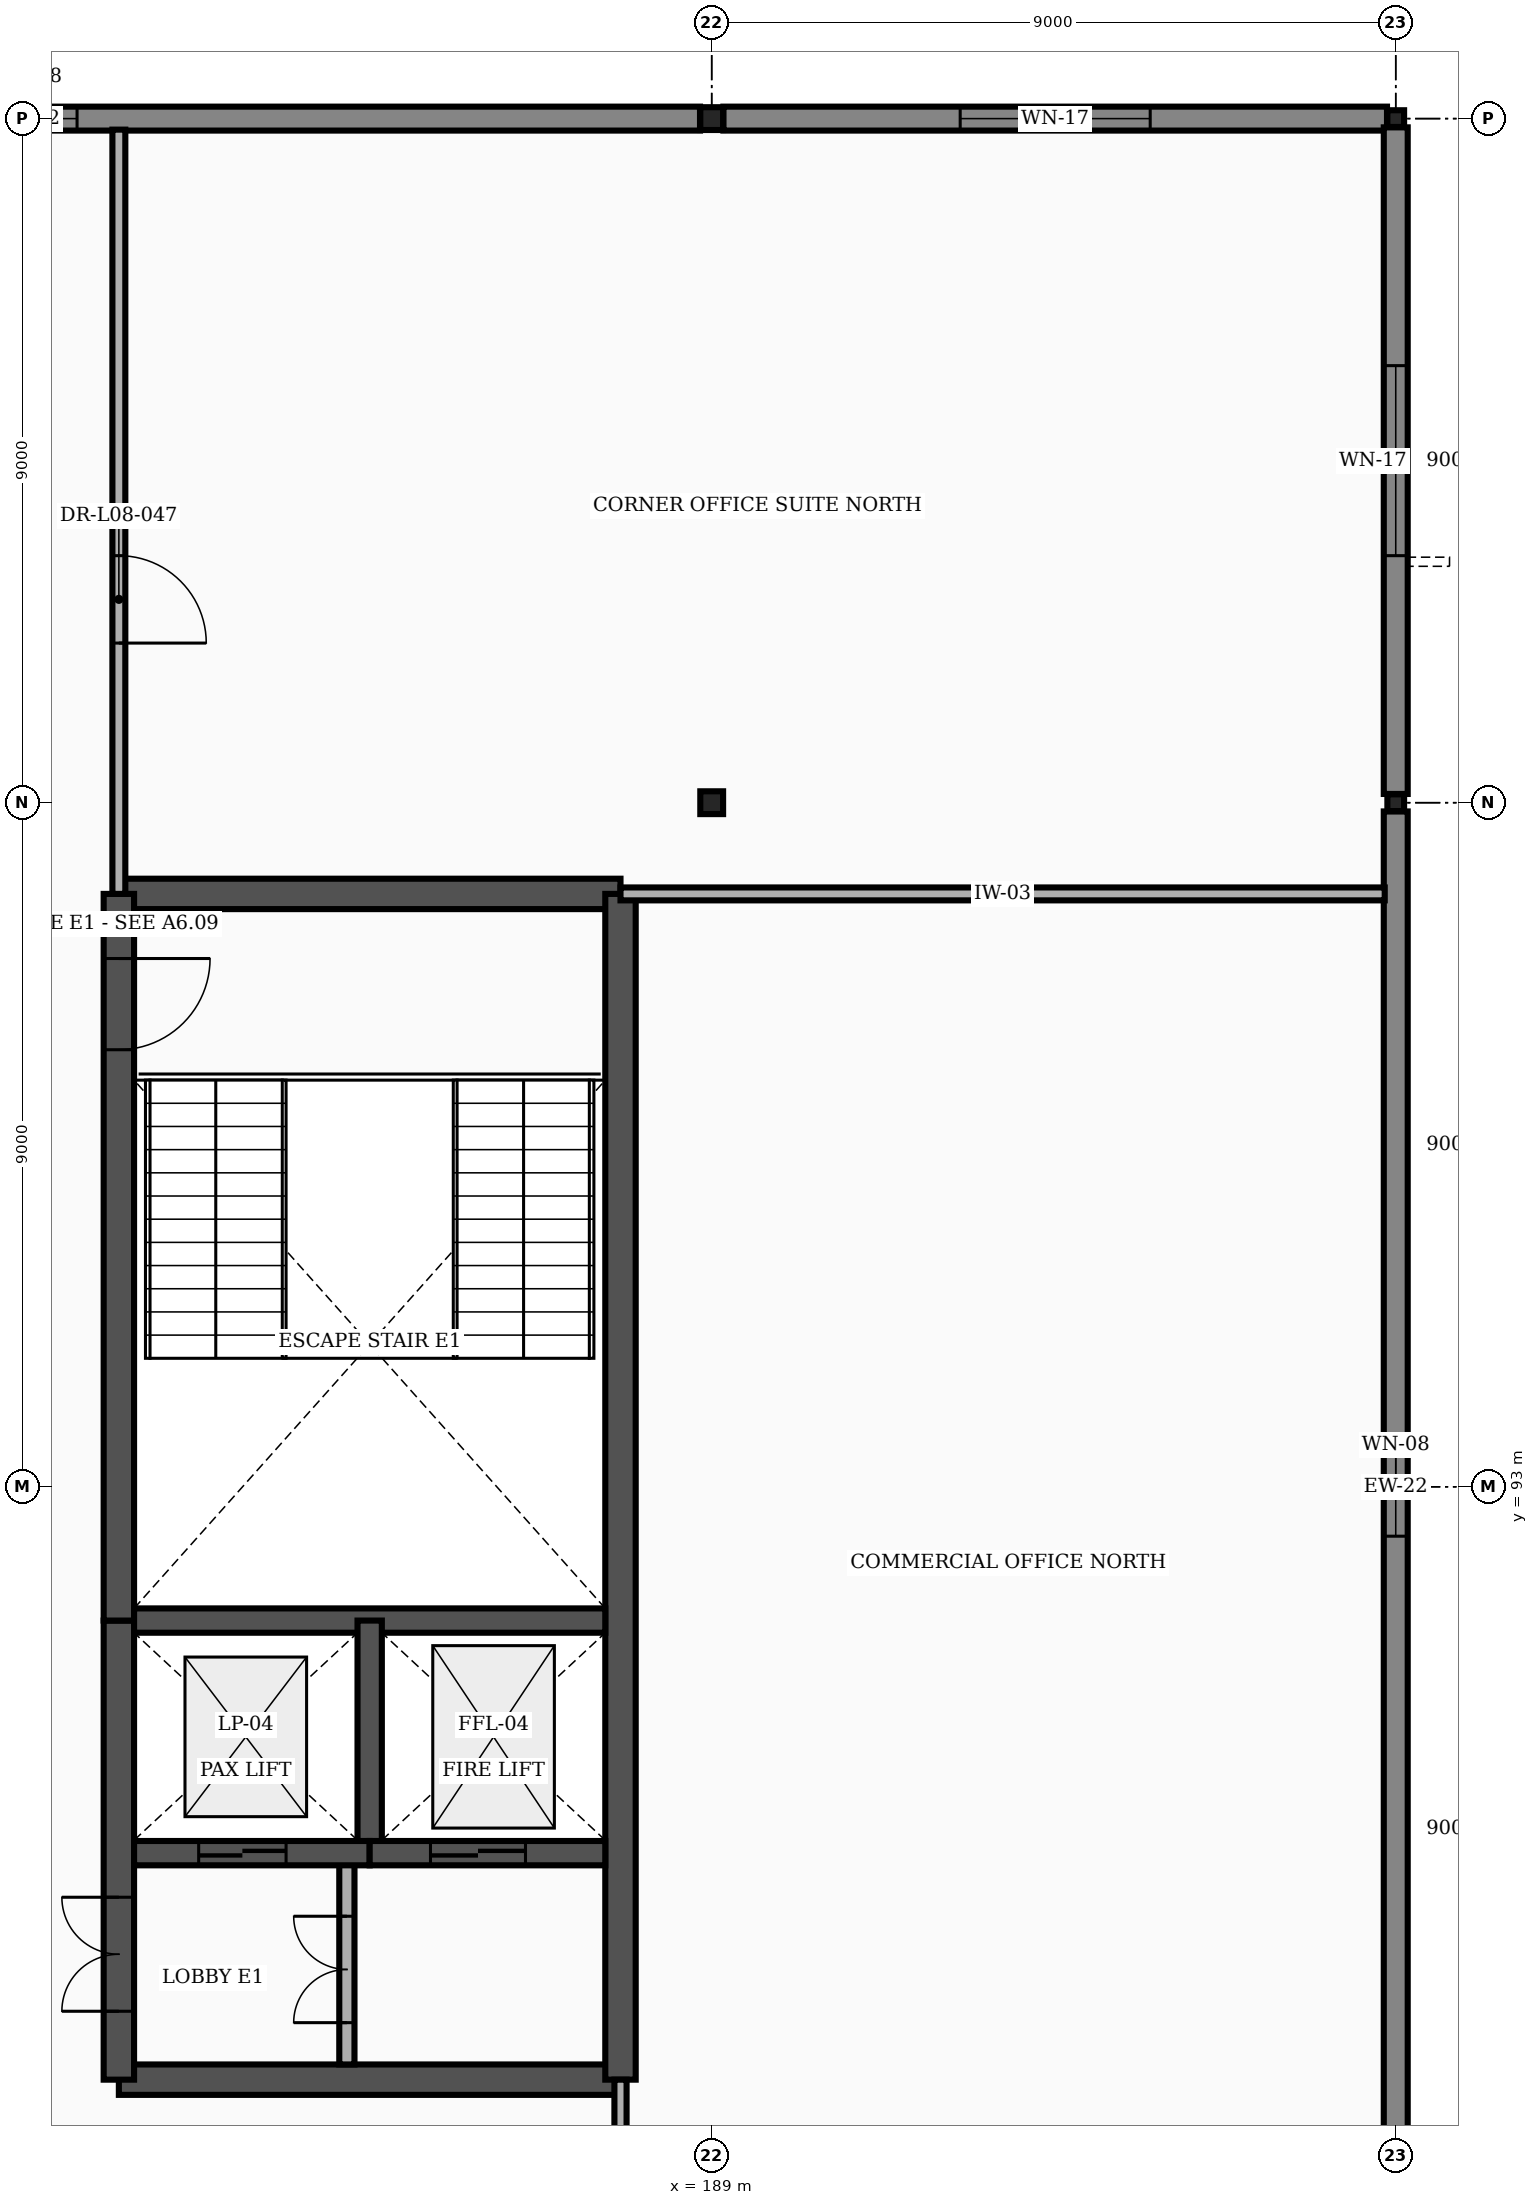
"""IFC4 building model, lengths in metres.
Left out: names, types, materials, properties, quantities, classifications, styles, units other than length and angle.
Written with IfcOpenShell. Run it as: python <this file> out.ifc"""

import sys

from ifc_helpers import new_model, si_unit, direction, frame, frame_2d, origin, origin_2d, place, context, subcontext, project, spatial, rectangle, hollow_rectangle, extrude, element, fill, save


model = new_model("IFC4")
c1 = context("Model", 3, precision=1e-05, world=origin(), true_north=direction((0.0, 1.0)))
c2 = subcontext(c1, "Body", "Model", "MODEL_VIEW")
j1 = project(units=[si_unit("LENGTHUNIT", "METRE"), si_unit("PLANEANGLEUNIT", "RADIAN")], contexts=[c1])
p1 = place(None, origin())
s1 = spatial("IfcSite", under=j1, at=p1, CompositionType="ELEMENT")
p2 = place(p1, origin())
s2 = spatial("IfcBuilding", under=s1, at=p2, CompositionType="ELEMENT")
p3 = place(p2, frame((0.0, 0.0, 37.8)))
s3 = spatial("IfcBuildingStorey", under=s2, at=p3, CompositionType="ELEMENT", Elevation=37.8)
for number, where, z_axis, x_axis in (
    (1, (189.0, 102.0, 0.0), (0.0, 0.0, 1.0), (1.0, 0.0, 0.0)),
    (2, (189.0, 111.0, 0.0), (0.0, 0.0, 1.0), (1.0, 0.0, 0.0)),
):
    element("IfcColumn", number, at=place(p3, frame(where, z_axis=z_axis, x_axis=x_axis)), inside=s3, PredefinedType="COLUMN", context=c2, shape_type="SweptSolid", body=[
        extrude(hollow_rectangle(XDim=0.3, YDim=0.3, WallThickness=0.012, at=origin_2d()), origin(), (0.0, 0.0, 1.0), 3.9),
    ])
for number, where, z_axis, x_axis in (
    (3, (198.0, 102.0, 0.0), (0.0, 0.0, 1.0), (1.0, 0.0, 0.0)),
    (4, (198.0, 111.0, 0.0), (0.0, 0.0, 1.0), (1.0, 0.0, 0.0)),
):
    element("IfcColumn", number, at=place(p3, frame(where, z_axis=z_axis, x_axis=x_axis)), inside=s3, PredefinedType="COLUMN", context=c2, shape_type="SweptSolid", body=[
        extrude(hollow_rectangle(XDim=0.22, YDim=0.22, WallThickness=0.01, at=origin_2d()), origin(), (0.0, 0.0, 1.0), 3.9),
    ])
p4 = place(p3, frame((171.154, 111.0, 0.0), z_axis=(0.0, 0.0, 1.0), x_axis=(1.0, 0.0, 0.0)))
e5 = element("IfcWall", 5, at=p4, inside=s3, PredefinedType="STANDARD", context=c2, shape_type="SweptSolid", body=[
    extrude(rectangle(XDim=17.692, YDim=0.315, at=frame_2d((8.846, 0.0))), origin(), (0.0, 0.0, 1.0), 2.803),
])
p5 = place(p4, frame((8.196, 0.0, 0.7)))
e6 = element("IfcOpeningElement", 6, at=p5, cuts=e5, PredefinedType="OPENING", context=c2, shape_type="SweptSolid", body=[
    extrude(rectangle(XDim=1.3, YDim=1.9, at=frame_2d((0.65, 0.95))), frame((0.0, 0.169, 0.0), z_axis=(0.0, -1.0, 0.0), x_axis=(1.0, 0.0, 0.0)), (0.0, 0.0, 1.0), 0.339),
])
p6 = place(p3, frame((189.154, 111.0, 0.0), z_axis=(0.0, 0.0, 1.0), x_axis=(1.0, 0.0, 0.0)))
e7 = element("IfcWall", 7, at=p6, inside=s3, PredefinedType="STANDARD", context=c2, shape_type="SweptSolid", body=[
    extrude(rectangle(XDim=8.731, YDim=0.315, at=frame_2d((4.366, 0.0))), origin(), (0.0, 0.0, 1.0), 3.565),
])
p7 = place(p6, frame((3.115, 0.0, 0.7)))
e8 = element("IfcOpeningElement", 8, at=p7, cuts=e7, PredefinedType="OPENING", context=c2, shape_type="SweptSolid", body=[
    extrude(rectangle(XDim=2.5, YDim=1.9, at=frame_2d((1.25, 0.95))), frame((0.0, 0.169, 0.0), z_axis=(0.0, -1.0, 0.0), x_axis=(1.0, 0.0, 0.0)), (0.0, 0.0, 1.0), 0.339),
])
p8 = place(p3, frame((198.0, 84.115, 0.0), z_axis=(0.0, 0.0, 1.0), x_axis=(0.0, 1.0, 0.0)))
e9 = element("IfcWall", 9, at=p8, inside=s3, PredefinedType="STANDARD", context=c2, shape_type="SweptSolid", body=[
    extrude(rectangle(XDim=17.77, YDim=0.315, at=frame_2d((8.885, 0.0))), origin(), (0.0, 0.0, 1.0), 2.953),
])
p9 = place(p8, frame((8.235, 0.0, 0.7)))
e10 = element("IfcOpeningElement", 10, at=p9, cuts=e9, PredefinedType="OPENING", context=c2, shape_type="SweptSolid", body=[
    extrude(rectangle(XDim=1.3, YDim=1.9, at=frame_2d((0.65, 0.95))), frame((0.0, 0.169, 0.0), z_axis=(0.0, -1.0, 0.0), x_axis=(1.0, 0.0, 0.0)), (0.0, 0.0, 1.0), 0.339),
])
p10 = place(p3, frame((198.0, 102.115, 0.0), z_axis=(0.0, 0.0, 1.0), x_axis=(0.0, 1.0, 0.0)))
e11 = element("IfcWall", 11, at=p10, inside=s3, PredefinedType="STANDARD", context=c2, shape_type="SweptSolid", body=[
    extrude(rectangle(XDim=8.77, YDim=0.315, at=frame_2d((4.385, 0.0))), origin(), (0.0, 0.0, 1.0), 3.565),
])
p11 = place(p10, frame((3.135, 0.0, 0.7)))
e12 = element("IfcOpeningElement", 12, at=p11, cuts=e11, PredefinedType="OPENING", context=c2, shape_type="SweptSolid", body=[
    extrude(rectangle(XDim=2.5, YDim=1.9, at=frame_2d((1.25, 0.95))), frame((0.0, 0.169, 0.0), z_axis=(0.0, -1.0, 0.0), x_axis=(1.0, 0.0, 0.0)), (0.0, 0.0, 1.0), 0.339),
])
for number, where, z_axis, x_axis in (
    (13, (181.2, 85.2, 0.0), (0.0, 0.0, 1.0), (1.0, 0.0, 0.0)),
    (14, (181.2, 100.8, 0.0), (0.0, 0.0, 1.0), (1.0, 0.0, 0.0)),
):
    element("IfcWall", number, at=place(p3, frame(where, z_axis=z_axis, x_axis=x_axis)), inside=s3, PredefinedType="SHEAR", context=c2, shape_type="SweptSolid", body=[
        extrude(rectangle(XDim=6.6, YDim=0.4, at=frame_2d((3.3, 0.0))), origin(), (0.0, 0.0, 1.0), 3.565),
    ])
p12 = place(p3, frame((187.8, 85.2, 0.0), z_axis=(0.0, 0.0, 1.0), x_axis=(0.0, 1.0, 0.0)))
e15 = element("IfcWall", 15, at=p12, inside=s3, PredefinedType="SHEAR", context=c2, shape_type="SweptSolid", body=[
    extrude(rectangle(XDim=15.6, YDim=0.4, at=frame_2d((7.8, 0.0))), origin(), (0.0, 0.0, 1.0), 3.565),
])
p13 = place(p3, frame((181.2, 85.2, 0.0), z_axis=(0.0, 0.0, 1.0), x_axis=(0.0, 1.0, 0.0)))
e16 = element("IfcWall", 16, at=p13, inside=s3, PredefinedType="SHEAR", context=c2, shape_type="SweptSolid", body=[
    extrude(rectangle(XDim=6.04, YDim=0.4, at=frame_2d((3.02, 0.0))), origin(), (0.0, 0.0, 1.0), 3.565),
])
p14 = place(p13, frame((0.9, 0.0, 0.0)))
e17 = element("IfcOpeningElement", 17, at=p14, cuts=e16, PredefinedType="OPENING", context=c2, shape_type="SweptSolid", body=[
    extrude(rectangle(XDim=1.5, YDim=2.2, at=frame_2d((0.75, 1.1))), frame((0.0, 0.212, 0.0), z_axis=(0.0, -1.0, 0.0), x_axis=(1.0, 0.0, 0.0)), (0.0, 0.0, 1.0), 0.424),
])
p15 = place(p3, frame((181.2, 91.24, 0.0), z_axis=(0.0, 0.0, 1.0), x_axis=(0.0, 1.0, 0.0)))
e18 = element("IfcWall", 18, at=p15, inside=s3, PredefinedType="SHEAR", context=c2, shape_type="SweptSolid", body=[
    extrude(rectangle(XDim=9.56, YDim=0.4, at=frame_2d((4.78, 0.0))), origin(), (0.0, 0.0, 1.0), 3.565),
])
p16 = place(p15, frame((7.51, 0.0, 0.0)))
e19 = element("IfcOpeningElement", 19, at=p16, cuts=e18, PredefinedType="OPENING", context=c2, shape_type="SweptSolid", body=[
    extrude(rectangle(XDim=1.2, YDim=2.2, at=frame_2d((0.6, 1.1))), frame((0.0, 0.212, 0.0), z_axis=(0.0, -1.0, 0.0), x_axis=(1.0, 0.0, 0.0)), (0.0, 0.0, 1.0), 0.424),
])
p17 = place(p3, frame((181.4, 91.24, 0.0), z_axis=(0.0, 0.0, 1.0), x_axis=(1.0, 0.0, 0.0)))
e20 = element("IfcWall", 20, at=p17, inside=s3, PredefinedType="SHEAR", context=c2, shape_type="SweptSolid", body=[
    extrude(rectangle(XDim=6.2, YDim=0.32, at=frame_2d((3.1, 0.0))), origin(), (0.0, 0.0, 1.0), 3.565),
])
p18 = place(p3, frame((184.5, 88.18, 0.0), z_axis=(0.0, 0.0, 1.0), x_axis=(0.0, 1.0, 0.0)))
e21 = element("IfcWall", 21, at=p18, inside=s3, PredefinedType="SHEAR", context=c2, shape_type="SweptSolid", body=[
    extrude(rectangle(XDim=3.06, YDim=0.32, at=frame_2d((1.53, 0.0))), origin(), (0.0, 0.0, 1.0), 3.565),
])
p19 = place(p3, frame((184.2, 85.4, 0.0), z_axis=(0.0, 0.0, 1.0), x_axis=(0.0, 1.0, 0.0)))
e22 = element("IfcWall", 22, at=p19, inside=s3, PredefinedType="PARTITIONING", context=c2, shape_type="SweptSolid", body=[
    extrude(rectangle(XDim=2.78, YDim=0.2, at=frame_2d((1.39, 0.0))), origin(), (0.0, 0.0, 1.0), 3.565),
])
p20 = place(p19, frame((0.55, 0.0, 0.0)))
e23 = element("IfcOpeningElement", 23, at=p20, cuts=e22, PredefinedType="OPENING", context=c2, shape_type="SweptSolid", body=[
    extrude(rectangle(XDim=1.4, YDim=2.25, at=frame_2d((0.7, 1.125))), frame((0.0, 0.112, 0.0), z_axis=(0.0, -1.0, 0.0), x_axis=(1.0, 0.0, 0.0)), (0.0, 0.0, 1.0), 0.224),
])
p21 = place(p3, frame((181.4, 88.18, 0.0), z_axis=(0.0, 0.0, 1.0), x_axis=(1.0, 0.0, 0.0)))
e24 = element("IfcWall", 24, at=p21, inside=s3, PredefinedType="SHEAR", context=c2, shape_type="SweptSolid", body=[
    extrude(rectangle(XDim=3.1, YDim=0.32, at=frame_2d((1.55, 0.0))), origin(), (0.0, 0.0, 1.0), 3.565),
])
p22 = place(p21, frame((0.85, 0.0, 0.0)))
e25 = element("IfcOpeningElement", 25, at=p22, cuts=e24, PredefinedType="OPENING", context=c2, shape_type="SweptSolid", body=[
    extrude(rectangle(XDim=1.15, YDim=2.2, at=frame_2d((0.575, 1.1))), frame((0.0, 0.172, 0.0), z_axis=(0.0, -1.0, 0.0), x_axis=(1.0, 0.0, 0.0)), (0.0, 0.0, 1.0), 0.344),
])
p23 = place(p3, frame((184.5, 88.18, 0.0), z_axis=(0.0, 0.0, 1.0), x_axis=(1.0, 0.0, 0.0)))
e26 = element("IfcWall", 26, at=p23, inside=s3, PredefinedType="SHEAR", context=c2, shape_type="SweptSolid", body=[
    extrude(rectangle(XDim=3.1, YDim=0.32, at=frame_2d((1.55, 0.0))), origin(), (0.0, 0.0, 1.0), 3.565),
])
p24 = place(p23, frame((0.8, 0.0, 0.0)))
e27 = element("IfcOpeningElement", 27, at=p24, cuts=e26, PredefinedType="OPENING", context=c2, shape_type="SweptSolid", body=[
    extrude(rectangle(XDim=1.25, YDim=2.25, at=frame_2d((0.625, 1.125))), frame((0.0, 0.172, 0.0), z_axis=(0.0, -1.0, 0.0), x_axis=(1.0, 0.0, 0.0)), (0.0, 0.0, 1.0), 0.344),
])
p25 = place(p3, frame((187.8, 83.2, 0.0), z_axis=(0.0, 0.0, 1.0), x_axis=(0.0, 1.0, 0.0)))
e28 = element("IfcWall", 28, at=p25, inside=s3, PredefinedType="PARTITIONING", context=c2, shape_type="SweptSolid", body=[
    extrude(rectangle(XDim=2.0, YDim=0.16, at=frame_2d((1.0, 0.0))), origin(), (0.0, 0.0, 1.0), 3.565),
])
p26 = place(p3, frame((187.8, 100.8, 0.0), z_axis=(0.0, 0.0, 1.0), x_axis=(1.0, 0.0, 0.0)))
e29 = element("IfcWall", 29, at=p26, inside=s3, PredefinedType="PARTITIONING", context=c2, shape_type="SweptSolid", body=[
    extrude(rectangle(XDim=10.055, YDim=0.17, at=frame_2d((5.027, 0.0))), origin(), (0.0, 0.0, 1.0), 3.565),
])
p27 = place(p3, frame((181.2, 100.8, 0.0), z_axis=(0.0, 0.0, 1.0), x_axis=(0.0, 1.0, 0.0)))
e30 = element("IfcWall", 30, at=p27, inside=s3, PredefinedType="PARTITIONING", context=c2, shape_type="SweptSolid", body=[
    extrude(rectangle(XDim=10.055, YDim=0.17, at=frame_2d((5.027, 0.0))), origin(), (0.0, 0.0, 1.0), 3.565),
])
p28 = place(p27, frame((3.3, 0.0, 0.0)))
e31 = element("IfcOpeningElement", 31, at=p28, cuts=e30, PredefinedType="OPENING", context=c2, shape_type="SweptSolid", body=[
    extrude(rectangle(XDim=1.15, YDim=2.15, at=frame_2d((0.575, 1.075))), frame((0.0, 0.097, 0.0), z_axis=(0.0, -1.0, 0.0), x_axis=(1.0, 0.0, 0.0)), (0.0, 0.0, 1.0), 0.194),
])
p29 = place(p5, origin())
e32 = element("IfcWindow", 32, at=p29, inside=s3, PartitioningType="SINGLE_PANEL", PredefinedType="WINDOW", context=c2, shape_type="SweptSolid", body=[
    extrude(rectangle(XDim=1.3, YDim=1.9, at=frame_2d((0.65, 0.95))), frame((0.0, 0.03, 0.0), z_axis=(0.0, -1.0, 0.0), x_axis=(1.0, 0.0, 0.0)), (0.0, 0.0, 1.0), 0.06),
])
fill(e6, e32)
p30 = place(p7, origin())
e33 = element("IfcWindow", 33, at=p30, inside=s3, PartitioningType="SINGLE_PANEL", PredefinedType="WINDOW", context=c2, shape_type="SweptSolid", body=[
    extrude(rectangle(XDim=2.5, YDim=1.9, at=frame_2d((1.25, 0.95))), frame((0.0, 0.03, 0.0), z_axis=(0.0, -1.0, 0.0), x_axis=(1.0, 0.0, 0.0)), (0.0, 0.0, 1.0), 0.06),
])
fill(e8, e33)
p31 = place(p9, origin())
e34 = element("IfcWindow", 34, at=p31, inside=s3, PartitioningType="SINGLE_PANEL", PredefinedType="WINDOW", context=c2, shape_type="SweptSolid", body=[
    extrude(rectangle(XDim=1.3, YDim=1.9, at=frame_2d((0.65, 0.95))), frame((0.0, 0.03, 0.0), z_axis=(0.0, -1.0, 0.0), x_axis=(1.0, 0.0, 0.0)), (0.0, 0.0, 1.0), 0.06),
])
fill(e10, e34)
p32 = place(p11, origin())
e35 = element("IfcWindow", 35, at=p32, inside=s3, PartitioningType="SINGLE_PANEL", PredefinedType="WINDOW", context=c2, shape_type="SweptSolid", body=[
    extrude(rectangle(XDim=2.5, YDim=1.9, at=frame_2d((1.25, 0.95))), frame((0.0, 0.03, 0.0), z_axis=(0.0, -1.0, 0.0), x_axis=(1.0, 0.0, 0.0)), (0.0, 0.0, 1.0), 0.06),
])
fill(e12, e35)
p33 = place(p14, origin())
e36 = element("IfcDoor", 36, at=p33, inside=s3, OperationType="DOUBLE_DOOR_SINGLE_SWING", PredefinedType="DOOR", context=c2, shape_type="SweptSolid", body=[
    extrude(rectangle(XDim=1.5, YDim=2.2, at=frame_2d((0.75, 1.1))), frame((0.0, 0.025, 0.0), z_axis=(0.0, -1.0, 0.0), x_axis=(1.0, 0.0, 0.0)), (0.0, 0.0, 1.0), 0.05),
])
fill(e17, e36)
p34 = place(p16, frame((1.2, 0.0, 0.0), z_axis=(0.0, 0.0, 1.0), x_axis=(-1.0, 0.0, 0.0)))
e37 = element("IfcDoor", 37, at=p34, inside=s3, OperationType="SINGLE_SWING_LEFT", PredefinedType="DOOR", context=c2, shape_type="SweptSolid", body=[
    extrude(rectangle(XDim=1.2, YDim=2.2, at=frame_2d((0.6, 1.1))), frame((0.0, 0.025, 0.0), z_axis=(0.0, -1.0, 0.0), x_axis=(1.0, 0.0, 0.0)), (0.0, 0.0, 1.0), 0.05),
])
fill(e19, e37)
p35 = place(p20, origin())
e38 = element("IfcDoor", 38, at=p35, inside=s3, OperationType="DOUBLE_DOOR_SINGLE_SWING", PredefinedType="DOOR", context=c2, shape_type="SweptSolid", body=[
    extrude(rectangle(XDim=1.4, YDim=2.25, at=frame_2d((0.7, 1.125))), frame((0.0, 0.025, 0.0), z_axis=(0.0, -1.0, 0.0), x_axis=(1.0, 0.0, 0.0)), (0.0, 0.0, 1.0), 0.05),
])
fill(e23, e38)
p36 = place(p22, origin())
e39 = element("IfcDoor", 39, at=p36, inside=s3, OperationType="DOUBLE_DOOR_SLIDING", PredefinedType="DOOR", context=c2, shape_type="SweptSolid", body=[
    extrude(rectangle(XDim=1.15, YDim=2.2, at=frame_2d((0.575, 1.1))), frame((0.0, 0.025, 0.0), z_axis=(0.0, -1.0, 0.0), x_axis=(1.0, 0.0, 0.0)), (0.0, 0.0, 1.0), 0.05),
])
fill(e25, e39)
p37 = place(p24, origin())
e40 = element("IfcDoor", 40, at=p37, inside=s3, OperationType="DOUBLE_DOOR_SLIDING", PredefinedType="DOOR", context=c2, shape_type="SweptSolid", body=[
    extrude(rectangle(XDim=1.25, YDim=2.25, at=frame_2d((0.625, 1.125))), frame((0.0, 0.025, 0.0), z_axis=(0.0, -1.0, 0.0), x_axis=(1.0, 0.0, 0.0)), (0.0, 0.0, 1.0), 0.05),
])
fill(e27, e40)
p38 = place(p28, frame((1.15, 0.0, 0.0), z_axis=(0.0, 0.0, 1.0), x_axis=(-1.0, 0.0, 0.0)))
e41 = element("IfcDoor", 41, at=p38, inside=s3, OperationType="SINGLE_SWING_RIGHT", PredefinedType="DOOR", context=c2, shape_type="SweptSolid", body=[
    extrude(rectangle(XDim=1.15, YDim=2.15, at=frame_2d((0.575, 1.075))), frame((0.0, 0.025, 0.0), z_axis=(0.0, -1.0, 0.0), x_axis=(1.0, 0.0, 0.0)), (0.0, 0.0, 1.0), 0.05),
])
fill(e31, e41)
save(model, sys.argv[1])
